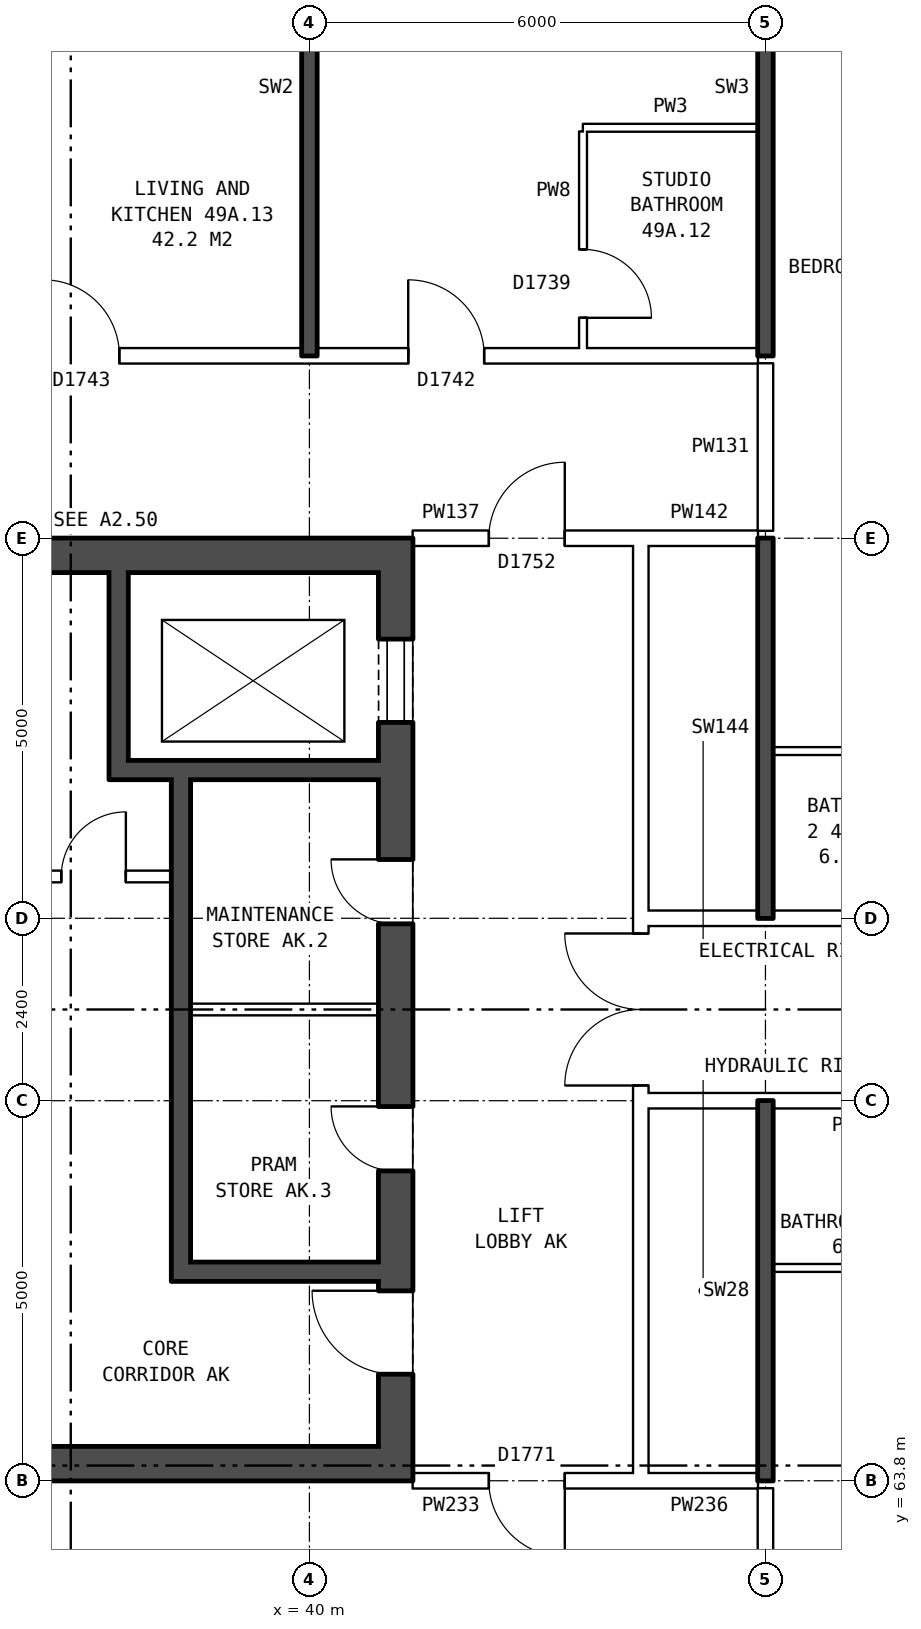
"""IFC4 building model, lengths in metres.
Left out: names, types, materials, properties, quantities, classifications, styles, units other than length and angle.
Written with IfcOpenShell. Run it as: python <this file> out.ifc"""

import sys

from ifc_helpers import new_model, si_unit, direction, frame, frame_2d, origin, place, context, subcontext, project, spatial, rectangle, extrude, element, fill, save


model = new_model("IFC4")
c1 = context("Model", 3, precision=1e-05, world=origin(), true_north=direction((0.0, 1.0)))
c2 = subcontext(c1, "Body", "Model", "MODEL_VIEW")
j1 = project(units=[si_unit("LENGTHUNIT", "METRE"), si_unit("PLANEANGLEUNIT", "RADIAN")], contexts=[c1])
p1 = place(None, origin())
s1 = spatial("IfcSite", under=j1, at=p1, CompositionType="ELEMENT")
p2 = place(p1, origin())
s2 = spatial("IfcBuilding", under=s1, at=p2, CompositionType="ELEMENT")
p3 = place(p2, frame((0.0, 0.0, 175.8)))
s3 = spatial("IfcBuildingStorey", under=s2, at=p3, CompositionType="ELEMENT", Elevation=175.8)
p4 = place(p3, frame((41.135, 76.2, 0.0), z_axis=(0.0, 0.0, 1.0), x_axis=(0.0, -1.0, 0.0)))
e1 = element("IfcWall", 1, at=p4, inside=s3, PredefinedType="SHEAR", context=c2, shape_type="SweptSolid", body=[
    extrude(rectangle(XDim=12.4, YDim=0.45, at=frame_2d((6.2, 0.0))), origin(), (0.0, 0.0, 1.0), 2.85),
])
p5 = place(p4, frame((1.325, 0.0, 0.0)))
e2 = element("IfcOpeningElement", 2, at=p5, cuts=e1, PredefinedType="OPENING", context=c2, shape_type="SweptSolid", body=[
    extrude(rectangle(XDim=1.1, YDim=2.1, at=frame_2d((0.55, 1.05))), frame((0.0, 0.235, 0.0), z_axis=(0.0, -1.0, 0.0), x_axis=(1.0, 0.0, 0.0)), (0.0, 0.0, 1.0), 0.47),
])
p6 = place(p4, frame((4.225, 0.0, 0.0)))
e3 = element("IfcOpeningElement", 3, at=p6, cuts=e1, PredefinedType="OPENING", context=c2, shape_type="SweptSolid", body=[
    extrude(rectangle(XDim=0.85, YDim=2.1, at=frame_2d((0.425, 1.05))), frame((0.0, 0.235, 0.0), z_axis=(0.0, -1.0, 0.0), x_axis=(1.0, 0.0, 0.0)), (0.0, 0.0, 1.0), 0.47),
])
p7 = place(p4, frame((7.475, 0.0, 0.0)))
e4 = element("IfcOpeningElement", 4, at=p7, cuts=e1, PredefinedType="OPENING", context=c2, shape_type="SweptSolid", body=[
    extrude(rectangle(XDim=0.85, YDim=2.1, at=frame_2d((0.425, 1.05))), frame((0.0, 0.235, 0.0), z_axis=(0.0, -1.0, 0.0), x_axis=(1.0, 0.0, 0.0)), (0.0, 0.0, 1.0), 0.47),
])
p8 = place(p4, frame((9.9, 0.0, 0.0)))
e5 = element("IfcOpeningElement", 5, at=p8, cuts=e1, PredefinedType="OPENING", context=c2, shape_type="SweptSolid", body=[
    extrude(rectangle(XDim=1.1, YDim=2.1, at=frame_2d((0.55, 1.05))), frame((0.0, 0.235, 0.0), z_axis=(0.0, -1.0, 0.0), x_axis=(1.0, 0.0, 0.0)), (0.0, 0.0, 1.0), 0.47),
])
for number, where, z_axis, x_axis in (
    (6, (40.91, 75.975, 0.0), (0.0, 0.0, 1.0), (-1.0, 0.0, 0.0)),
    (7, (40.91, 64.025, 0.0), (0.0, 0.0, 1.0), (-1.0, 0.0, 0.0)),
):
    element("IfcWall", number, at=place(p3, frame(where, z_axis=z_axis, x_axis=x_axis)), inside=s3, PredefinedType="SHEAR", context=c2, shape_type="SweptSolid", body=[
        extrude(rectangle(XDim=8.1, YDim=0.45, at=frame_2d((4.05, 0.0))), origin(), (0.0, 0.0, 1.0), 2.85),
    ])
p9 = place(p3, frame((40.91, 73.15, 0.0), z_axis=(0.0, 0.0, 1.0), x_axis=(-1.0, 0.0, 0.0)))
e8 = element("IfcWall", 8, at=p9, inside=s3, PredefinedType="SHEAR", context=c2, shape_type="SweptSolid", body=[
    extrude(rectangle(XDim=3.545, YDim=0.25, at=frame_2d((1.772, 0.0))), origin(), (0.0, 0.0, 1.0), 2.85),
])
p10 = place(p3, frame((38.185, 71.75, 0.0), z_axis=(0.0, 0.0, 1.0), x_axis=(-1.0, 0.0, 0.0)))
e9 = element("IfcWall", 9, at=p10, inside=s3, PredefinedType="PARTITIONING", context=c2, shape_type="SweptSolid", body=[
    extrude(rectangle(XDim=2.05, YDim=0.15, at=frame_2d((1.025, 0.0))), origin(), (0.0, 0.0, 1.0), 2.85),
])
p11 = place(p10, frame((0.6, 0.0, 0.0)))
e10 = element("IfcOpeningElement", 10, at=p11, cuts=e9, PredefinedType="OPENING", context=c2, shape_type="SweptSolid", body=[
    extrude(rectangle(XDim=0.85, YDim=2.1, at=frame_2d((0.425, 1.05))), frame((0.0, 0.085, 0.0), z_axis=(0.0, -1.0, 0.0), x_axis=(1.0, 0.0, 0.0)), (0.0, 0.0, 1.0), 0.17),
])
p12 = place(p3, frame((40.91, 70.0, 0.0), z_axis=(0.0, 0.0, 1.0), x_axis=(-1.0, 0.0, 0.0)))
e11 = element("IfcWall", 11, at=p12, inside=s3, PredefinedType="PARTITIONING", context=c2, shape_type="SweptSolid", body=[
    extrude(rectangle(XDim=2.475, YDim=0.15, at=frame_2d((1.237, 0.0))), origin(), (0.0, 0.0, 1.0), 2.85),
])
p13 = place(p3, frame((40.91, 66.55, 0.0), z_axis=(0.0, 0.0, 1.0), x_axis=(-1.0, 0.0, 0.0)))
e12 = element("IfcWall", 12, at=p13, inside=s3, PredefinedType="SHEAR", context=c2, shape_type="SweptSolid", body=[
    extrude(rectangle(XDim=2.475, YDim=0.25, at=frame_2d((1.237, 0.0))), origin(), (0.0, 0.0, 1.0), 2.85),
])
p14 = place(p3, frame((38.31, 73.025, 0.0), z_axis=(0.0, 0.0, 1.0), x_axis=(0.0, -1.0, 0.0)))
e13 = element("IfcWall", 13, at=p14, inside=s3, PredefinedType="SHEAR", context=c2, shape_type="SweptSolid", body=[
    extrude(rectangle(XDim=6.6, YDim=0.25, at=frame_2d((3.3, 0.0))), origin(), (0.0, 0.0, 1.0), 2.85),
])
p15 = place(p3, frame((37.49, 75.75, 0.0), z_axis=(0.0, 0.0, 1.0), x_axis=(0.0, -1.0, 0.0)))
e14 = element("IfcWall", 14, at=p15, inside=s3, PredefinedType="SHEAR", context=c2, shape_type="SweptSolid", body=[
    extrude(rectangle(XDim=2.475, YDim=0.25, at=frame_2d((1.238, 0.0))), origin(), (0.0, 0.0, 1.0), 2.85),
])
p16 = place(p3, frame((44.36, 63.9, 0.0), z_axis=(0.0, 0.0, 1.0), x_axis=(0.0, 1.0, 0.0)))
e15 = element("IfcWall", 15, at=p16, inside=s3, PredefinedType="PARTITIONING", context=c2, shape_type="SweptSolid", body=[
    extrude(rectangle(XDim=12.2, YDim=0.2, at=frame_2d((6.1, 0.0))), origin(), (0.0, 0.0, 1.0), 2.85),
])
p17 = place(p16, frame((5.1, 0.0, 0.0)))
e16 = element("IfcOpeningElement", 16, at=p17, cuts=e15, PredefinedType="OPENING", context=c2, shape_type="SweptSolid", body=[
    extrude(rectangle(XDim=2.0, YDim=2.1, at=frame_2d((1.0, 1.05))), frame((0.0, 0.11, 0.0), z_axis=(0.0, -1.0, 0.0), x_axis=(1.0, 0.0, 0.0)), (0.0, 0.0, 1.0), 0.22),
])
p18 = place(p3, frame((41.36, 63.8, 0.0), z_axis=(0.0, 0.0, 1.0), x_axis=(1.0, 0.0, 0.0)))
e17 = element("IfcWall", 17, at=p18, inside=s3, PredefinedType="PARTITIONING", context=c2, shape_type="SweptSolid", body=[
    extrude(rectangle(XDim=3.0, YDim=0.2, at=frame_2d((1.5, 0.0))), origin(), (0.0, 0.0, 1.0), 2.85),
])
p19 = place(p18, frame((1.0, 0.0, 0.0)))
e18 = element("IfcOpeningElement", 18, at=p19, cuts=e17, PredefinedType="OPENING", context=c2, shape_type="SweptSolid", body=[
    extrude(rectangle(XDim=1.0, YDim=2.1, at=frame_2d((0.5, 1.05))), frame((0.0, 0.11, 0.0), z_axis=(0.0, -1.0, 0.0), x_axis=(1.0, 0.0, 0.0)), (0.0, 0.0, 1.0), 0.22),
])
p20 = place(p3, frame((44.36, 63.8, 0.0), z_axis=(0.0, 0.0, 1.0), x_axis=(1.0, 0.0, 0.0)))
e19 = element("IfcWall", 19, at=p20, inside=s3, PredefinedType="PARTITIONING", context=c2, shape_type="SweptSolid", body=[
    extrude(rectangle(XDim=1.54, YDim=0.2, at=frame_2d((0.77, 0.0))), origin(), (0.0, 0.0, 1.0), 2.85),
])
p21 = place(p3, frame((46.1, 66.6, 0.0), z_axis=(0.0, 0.0, 1.0), x_axis=(1.0, 0.0, 0.0)))
e20 = element("IfcWall", 20, at=p21, inside=s3, PredefinedType="PARTITIONING", context=c2, shape_type="SweptSolid", body=[
    extrude(rectangle(XDim=2.9, YDim=0.1, at=frame_2d((1.45, 0.0))), origin(), (0.0, 0.0, 1.0), 2.85),
])
p22 = place(p3, frame((44.36, 68.8, 0.0), z_axis=(0.0, 0.0, 1.0), x_axis=(1.0, 0.0, 0.0)))
e21 = element("IfcWall", 21, at=p22, inside=s3, PredefinedType="PARTITIONING", context=c2, shape_type="SweptSolid", body=[
    extrude(rectangle(XDim=19.28, YDim=0.2, at=frame_2d((9.64, 0.0))), origin(), (0.0, 0.0, 1.0), 2.85),
])
p23 = place(p22, frame((14.64, 0.0, 0.0)))
e22 = element("IfcOpeningElement", 22, at=p23, cuts=e21, PredefinedType="OPENING", context=c2, shape_type="SweptSolid", body=[
    extrude(rectangle(XDim=1.0, YDim=2.1, at=frame_2d((0.5, 1.05))), frame((0.0, 0.11, 0.0), z_axis=(0.0, -1.0, 0.0), x_axis=(1.0, 0.0, 0.0)), (0.0, 0.0, 1.0), 0.22),
])
p24 = place(p22, frame((11.64, 0.0, 0.0)))
e23 = element("IfcOpeningElement", 23, at=p24, cuts=e21, PredefinedType="OPENING", context=c2, shape_type="SweptSolid", body=[
    extrude(rectangle(XDim=1.0, YDim=2.1, at=frame_2d((0.5, 1.05))), frame((0.0, 0.11, 0.0), z_axis=(0.0, -1.0, 0.0), x_axis=(1.0, 0.0, 0.0)), (0.0, 0.0, 1.0), 0.22),
])
p25 = place(p22, frame((5.64, 0.0, 0.0)))
e24 = element("IfcOpeningElement", 24, at=p25, cuts=e21, PredefinedType="OPENING", context=c2, shape_type="SweptSolid", body=[
    extrude(rectangle(XDim=1.0, YDim=2.1, at=frame_2d((0.5, 1.05))), frame((0.0, 0.11, 0.0), z_axis=(0.0, -1.0, 0.0), x_axis=(1.0, 0.0, 0.0)), (0.0, 0.0, 1.0), 0.22),
])
p26 = place(p3, frame((44.36, 71.2, 0.0), z_axis=(0.0, 0.0, 1.0), x_axis=(1.0, 0.0, 0.0)))
e25 = element("IfcWall", 25, at=p26, inside=s3, PredefinedType="PARTITIONING", context=c2, shape_type="SweptSolid", body=[
    extrude(rectangle(XDim=19.28, YDim=0.2, at=frame_2d((9.64, 0.0))), origin(), (0.0, 0.0, 1.0), 2.85),
])
p27 = place(p26, frame((14.64, 0.0, 0.0)))
e26 = element("IfcOpeningElement", 26, at=p27, cuts=e25, PredefinedType="OPENING", context=c2, shape_type="SweptSolid", body=[
    extrude(rectangle(XDim=1.0, YDim=2.1, at=frame_2d((0.5, 1.05))), frame((0.0, 0.11, 0.0), z_axis=(0.0, -1.0, 0.0), x_axis=(1.0, 0.0, 0.0)), (0.0, 0.0, 1.0), 0.22),
])
p28 = place(p26, frame((5.64, 0.0, 0.0)))
e27 = element("IfcOpeningElement", 27, at=p28, cuts=e25, PredefinedType="OPENING", context=c2, shape_type="SweptSolid", body=[
    extrude(rectangle(XDim=1.0, YDim=2.1, at=frame_2d((0.5, 1.05))), frame((0.0, 0.11, 0.0), z_axis=(0.0, -1.0, 0.0), x_axis=(1.0, 0.0, 0.0)), (0.0, 0.0, 1.0), 0.22),
])
p29 = place(p3, frame((46.1, 73.4, 0.0), z_axis=(0.0, 0.0, 1.0), x_axis=(1.0, 0.0, 0.0)))
e28 = element("IfcWall", 28, at=p29, inside=s3, PredefinedType="PARTITIONING", context=c2, shape_type="SweptSolid", body=[
    extrude(rectangle(XDim=2.9, YDim=0.1, at=frame_2d((1.45, 0.0))), origin(), (0.0, 0.0, 1.0), 2.85),
])
p30 = place(p3, frame((41.36, 76.2, 0.0), z_axis=(0.0, 0.0, 1.0), x_axis=(1.0, 0.0, 0.0)))
e29 = element("IfcWall", 29, at=p30, inside=s3, PredefinedType="PARTITIONING", context=c2, shape_type="SweptSolid", body=[
    extrude(rectangle(XDim=3.0, YDim=0.2, at=frame_2d((1.5, 0.0))), origin(), (0.0, 0.0, 1.0), 2.85),
])
p31 = place(p30, frame((1.0, 0.0, 0.0)))
e30 = element("IfcOpeningElement", 30, at=p31, cuts=e29, PredefinedType="OPENING", context=c2, shape_type="SweptSolid", body=[
    extrude(rectangle(XDim=1.0, YDim=2.1, at=frame_2d((0.5, 1.05))), frame((0.0, 0.11, 0.0), z_axis=(0.0, -1.0, 0.0), x_axis=(1.0, 0.0, 0.0)), (0.0, 0.0, 1.0), 0.22),
])
p32 = place(p3, frame((44.36, 76.2, 0.0), z_axis=(0.0, 0.0, 1.0), x_axis=(1.0, 0.0, 0.0)))
e31 = element("IfcWall", 31, at=p32, inside=s3, PredefinedType="PARTITIONING", context=c2, shape_type="SweptSolid", body=[
    extrude(rectangle(XDim=1.54, YDim=0.2, at=frame_2d((0.77, 0.0))), origin(), (0.0, 0.0, 1.0), 2.85),
])
p33 = place(p3, frame((30.61, 78.6, 0.0), z_axis=(0.0, 0.0, 1.0), x_axis=(1.0, 0.0, 0.0)))
e32 = element("IfcWall", 32, at=p33, inside=s3, PredefinedType="PARTITIONING", context=c2, shape_type="SweptSolid", body=[
    extrude(rectangle(XDim=15.29, YDim=0.2, at=frame_2d((7.645, 0.0))), origin(), (0.0, 0.0, 1.0), 2.85),
])
p34 = place(p33, frame((10.69, 0.0, 0.0)))
e33 = element("IfcOpeningElement", 33, at=p34, cuts=e32, PredefinedType="OPENING", context=c2, shape_type="SweptSolid", body=[
    extrude(rectangle(XDim=1.0, YDim=2.1, at=frame_2d((0.5, 1.05))), frame((0.0, 0.11, 0.0), z_axis=(0.0, -1.0, 0.0), x_axis=(1.0, 0.0, 0.0)), (0.0, 0.0, 1.0), 0.22),
])
p35 = place(p33, frame((5.89, 0.0, 0.0)))
e34 = element("IfcOpeningElement", 34, at=p35, cuts=e32, PredefinedType="OPENING", context=c2, shape_type="SweptSolid", body=[
    extrude(rectangle(XDim=1.0, YDim=2.1, at=frame_2d((0.5, 1.05))), frame((0.0, 0.11, 0.0), z_axis=(0.0, -1.0, 0.0), x_axis=(1.0, 0.0, 0.0)), (0.0, 0.0, 1.0), 0.22),
])
p36 = place(p3, frame((43.6, 81.6, 0.0), z_axis=(0.0, 0.0, 1.0), x_axis=(1.0, 0.0, 0.0)))
e35 = element("IfcWall", 35, at=p36, inside=s3, PredefinedType="PARTITIONING", context=c2, shape_type="SweptSolid", body=[
    extrude(rectangle(XDim=2.3, YDim=0.1, at=frame_2d((1.15, 0.0))), origin(), (0.0, 0.0, 1.0), 2.85),
])
p37 = place(p3, frame((40.0, 78.6, 0.0), z_axis=(0.0, 0.0, 1.0), x_axis=(0.0, 1.0, 0.0)))
e36 = element("IfcWall", 36, at=p37, inside=s3, PredefinedType="SOLIDWALL", context=c2, shape_type="SweptSolid", body=[
    extrude(rectangle(XDim=7.04, YDim=0.2, at=frame_2d((3.52, 0.0))), origin(), (0.0, 0.0, 1.0), 2.85),
])
p38 = place(p3, frame((43.6, 78.7, 0.0), z_axis=(0.0, 0.0, 1.0), x_axis=(0.0, 1.0, 0.0)))
e37 = element("IfcWall", 37, at=p38, inside=s3, PredefinedType="PARTITIONING", context=c2, shape_type="SweptSolid", body=[
    extrude(rectangle(XDim=2.85, YDim=0.1, at=frame_2d((1.425, 0.0))), origin(), (0.0, 0.0, 1.0), 2.85),
])
p39 = place(p38, frame((0.4, 0.0, 0.0)))
e38 = element("IfcOpeningElement", 38, at=p39, cuts=e37, PredefinedType="OPENING", context=c2, shape_type="SweptSolid", body=[
    extrude(rectangle(XDim=0.9, YDim=2.1, at=frame_2d((0.45, 1.05))), frame((0.0, 0.06, 0.0), z_axis=(0.0, -1.0, 0.0), x_axis=(1.0, 0.0, 0.0)), (0.0, 0.0, 1.0), 0.12),
])
p40 = place(p3, frame((46.0, 61.5, 0.0), z_axis=(0.0, 0.0, 1.0), x_axis=(0.0, 1.0, 0.0)))
e39 = element("IfcWall", 39, at=p40, inside=s3, PredefinedType="PARTITIONING", context=c2, shape_type="SweptSolid", body=[
    extrude(rectangle(XDim=2.2, YDim=0.2, at=frame_2d((1.1, 0.0))), origin(), (0.0, 0.0, 1.0), 2.85),
])
for number, where, z_axis, x_axis in (
    (40, (46.0, 63.8, 0.0), (0.0, 0.0, 1.0), (0.0, 1.0, 0.0)),
    (41, (46.0, 71.2, 0.0), (0.0, 0.0, 1.0), (0.0, 1.0, 0.0)),
):
    element("IfcWall", number, at=place(p3, frame(where, z_axis=z_axis, x_axis=x_axis)), inside=s3, PredefinedType="SOLIDWALL", context=c2, shape_type="SweptSolid", body=[
        extrude(rectangle(XDim=5.0, YDim=0.2, at=frame_2d((2.5, 0.0))), origin(), (0.0, 0.0, 1.0), 2.85),
    ])
p41 = place(p3, frame((46.0, 76.3, 0.0), z_axis=(0.0, 0.0, 1.0), x_axis=(0.0, 1.0, 0.0)))
e42 = element("IfcWall", 42, at=p41, inside=s3, PredefinedType="PARTITIONING", context=c2, shape_type="SweptSolid", body=[
    extrude(rectangle(XDim=2.2, YDim=0.2, at=frame_2d((1.1, 0.0))), origin(), (0.0, 0.0, 1.0), 2.85),
])
p42 = place(p3, frame((46.0, 78.6, 0.0), z_axis=(0.0, 0.0, 1.0), x_axis=(0.0, 1.0, 0.0)))
e43 = element("IfcWall", 43, at=p42, inside=s3, PredefinedType="SOLIDWALL", context=c2, shape_type="SweptSolid", body=[
    extrude(rectangle(XDim=7.04, YDim=0.2, at=frame_2d((3.52, 0.0))), origin(), (0.0, 0.0, 1.0), 2.85),
])
p43 = place(p5, origin())
e44 = element("IfcDoor", 44, at=p43, inside=s3, OperationType="DOUBLE_DOOR_SLIDING", PredefinedType="DOOR", context=c2, shape_type="SweptSolid", body=[
    extrude(rectangle(XDim=1.1, YDim=2.1, at=frame_2d((0.55, 1.05))), frame((0.0, -0.16, 0.0), z_axis=(0.0, -1.0, 0.0), x_axis=(1.0, 0.0, 0.0)), (0.0, 0.0, 1.0), 0.05),
])
fill(e2, e44)
p44 = place(p6, frame((0.85, 0.0, 0.0), z_axis=(0.0, 0.0, 1.0), x_axis=(-1.0, 0.0, 0.0)))
e45 = element("IfcDoor", 45, at=p44, inside=s3, OperationType="SINGLE_SWING_RIGHT", PredefinedType="DOOR", context=c2, shape_type="SweptSolid", body=[
    extrude(rectangle(XDim=0.85, YDim=2.1, at=frame_2d((0.425, 1.05))), frame((0.0, 0.21, 0.0), z_axis=(0.0, -1.0, 0.0), x_axis=(1.0, 0.0, 0.0)), (0.0, 0.0, 1.0), 0.05),
])
fill(e3, e45)
p45 = place(p7, frame((0.85, 0.0, 0.0), z_axis=(0.0, 0.0, 1.0), x_axis=(-1.0, 0.0, 0.0)))
e46 = element("IfcDoor", 46, at=p45, inside=s3, OperationType="SINGLE_SWING_RIGHT", PredefinedType="DOOR", context=c2, shape_type="SweptSolid", body=[
    extrude(rectangle(XDim=0.85, YDim=2.1, at=frame_2d((0.425, 1.05))), frame((0.0, 0.21, 0.0), z_axis=(0.0, -1.0, 0.0), x_axis=(1.0, 0.0, 0.0)), (0.0, 0.0, 1.0), 0.05),
])
fill(e4, e46)
p46 = place(p8, frame((1.1, 0.0, 0.0), z_axis=(0.0, 0.0, 1.0), x_axis=(-1.0, 0.0, 0.0)))
e47 = element("IfcDoor", 47, at=p46, inside=s3, OperationType="SINGLE_SWING_RIGHT", PredefinedType="DOOR", context=c2, shape_type="SweptSolid", body=[
    extrude(rectangle(XDim=1.1, YDim=2.1, at=frame_2d((0.55, 1.05))), frame((0.0, 0.21, 0.0), z_axis=(0.0, -1.0, 0.0), x_axis=(1.0, 0.0, 0.0)), (0.0, 0.0, 1.0), 0.05),
])
fill(e5, e47)
p47 = place(p11, frame((0.85, 0.0, 0.0), z_axis=(0.0, 0.0, 1.0), x_axis=(-1.0, 0.0, 0.0)))
e48 = element("IfcDoor", 48, at=p47, inside=s3, OperationType="SINGLE_SWING_RIGHT", PredefinedType="DOOR", context=c2, shape_type="SweptSolid", body=[
    extrude(rectangle(XDim=0.85, YDim=2.1, at=frame_2d((0.425, 1.05))), frame((0.0, 0.025, 0.0), z_axis=(0.0, -1.0, 0.0), x_axis=(1.0, 0.0, 0.0)), (0.0, 0.0, 1.0), 0.05),
])
fill(e10, e48)
p48 = place(p17, origin())
e49 = element("IfcDoor", 49, at=p48, inside=s3, OperationType="DOUBLE_DOOR_SINGLE_SWING", PredefinedType="DOOR", context=c2, shape_type="SweptSolid", body=[
    extrude(rectangle(XDim=2.0, YDim=2.1, at=frame_2d((1.0, 1.05))), frame((0.0, 0.025, 0.0), z_axis=(0.0, -1.0, 0.0), x_axis=(1.0, 0.0, 0.0)), (0.0, 0.0, 1.0), 0.05),
])
fill(e16, e49)
p49 = place(p19, frame((1.0, 0.0, 0.0), z_axis=(0.0, 0.0, 1.0), x_axis=(-1.0, 0.0, 0.0)))
e50 = element("IfcDoor", 50, at=p49, inside=s3, OperationType="SINGLE_SWING_LEFT", PredefinedType="DOOR", context=c2, shape_type="SweptSolid", body=[
    extrude(rectangle(XDim=1.0, YDim=2.1, at=frame_2d((0.5, 1.05))), frame((0.0, 0.025, 0.0), z_axis=(0.0, -1.0, 0.0), x_axis=(1.0, 0.0, 0.0)), (0.0, 0.0, 1.0), 0.05),
])
fill(e18, e50)
p50 = place(p31, origin())
e51 = element("IfcDoor", 51, at=p50, inside=s3, OperationType="SINGLE_SWING_RIGHT", PredefinedType="DOOR", context=c2, shape_type="SweptSolid", body=[
    extrude(rectangle(XDim=1.0, YDim=2.1, at=frame_2d((0.5, 1.05))), frame((0.0, 0.025, 0.0), z_axis=(0.0, -1.0, 0.0), x_axis=(1.0, 0.0, 0.0)), (0.0, 0.0, 1.0), 0.05),
])
fill(e30, e51)
p51 = place(p34, origin())
e52 = element("IfcDoor", 52, at=p51, inside=s3, OperationType="SINGLE_SWING_LEFT", PredefinedType="DOOR", context=c2, shape_type="SweptSolid", body=[
    extrude(rectangle(XDim=1.0, YDim=2.1, at=frame_2d((0.5, 1.05))), frame((0.0, 0.025, 0.0), z_axis=(0.0, -1.0, 0.0), x_axis=(1.0, 0.0, 0.0)), (0.0, 0.0, 1.0), 0.05),
])
fill(e33, e52)
p52 = place(p39, frame((0.9, 0.0, 0.0), z_axis=(0.0, 0.0, 1.0), x_axis=(-1.0, 0.0, 0.0)))
e53 = element("IfcDoor", 53, at=p52, inside=s3, OperationType="SINGLE_SWING_RIGHT", PredefinedType="DOOR", context=c2, shape_type="SweptSolid", body=[
    extrude(rectangle(XDim=0.9, YDim=2.1, at=frame_2d((0.45, 1.05))), frame((0.0, 0.025, 0.0), z_axis=(0.0, -1.0, 0.0), x_axis=(1.0, 0.0, 0.0)), (0.0, 0.0, 1.0), 0.05),
])
fill(e38, e53)
p53 = place(p35, origin())
e54 = element("IfcDoor", 54, at=p53, inside=s3, OperationType="SINGLE_SWING_LEFT", PredefinedType="DOOR", context=c2, shape_type="SweptSolid", body=[
    extrude(rectangle(XDim=1.0, YDim=2.1, at=frame_2d((0.5, 1.05))), frame((0.0, 0.025, 0.0), z_axis=(0.0, -1.0, 0.0), x_axis=(1.0, 0.0, 0.0)), (0.0, 0.0, 1.0), 0.05),
])
fill(e34, e54)
save(model, sys.argv[1])
